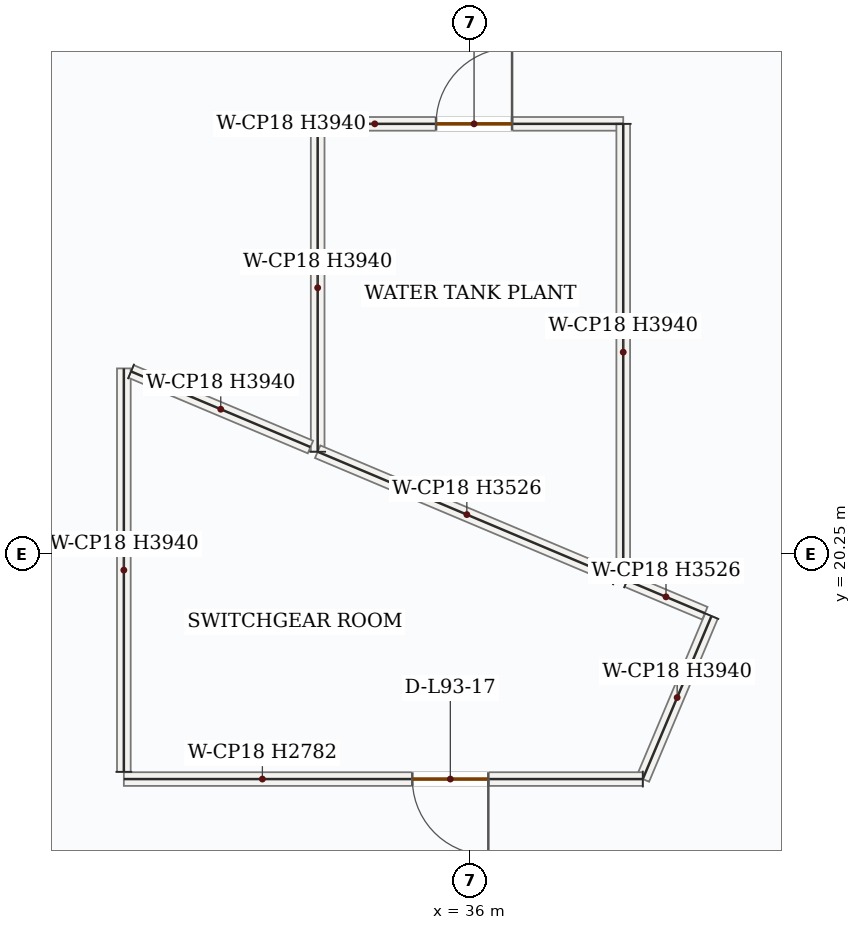
"""IFC4 building model, lengths in metres.
Left out: names, types, materials, properties, quantities, classifications, styles, units other than length and angle.
Written with IfcOpenShell. Run it as: python <this file> out.ifc"""

import sys

from ifc_helpers import new_model, si_unit, direction, frame, frame_2d, origin, place, context, subcontext, project, spatial, rectangle, extrude, source, transform, mapped, element, fill, save


model = new_model("IFC4")
c1 = context("Model", 3, precision=1e-05, world=origin(), true_north=direction((0.0, 1.0)))
c2 = subcontext(c1, "Body", "Model", "MODEL_VIEW")
j1 = project(units=[si_unit("LENGTHUNIT", "METRE"), si_unit("PLANEANGLEUNIT", "RADIAN")], contexts=[c1])
p1 = place(None, origin())
s1 = spatial("IfcSite", under=j1, at=p1, CompositionType="ELEMENT")
p2 = place(p1, origin())
s2 = spatial("IfcBuilding", under=s1, at=p2, CompositionType="ELEMENT")
p3 = place(p2, frame((0.0, 0.0, 383.85)))
s3 = spatial("IfcBuildingStorey", under=s2, at=p3, CompositionType="ELEMENT", Elevation=383.85)
m1 = source(origin(), c2, "Body", "SweptSolid", [
    extrude(rectangle(XDim=4.313, YDim=0.18, at=frame_2d((2.157, 0.0))), origin(), (0.0, 0.0, 1.0), 3.94),
])
p4 = place(p3, frame((33.99, 21.596, 0.0), z_axis=(0.0, 0.0, 1.0), x_axis=(0.0, 1.0, 0.0)))
e1 = element("IfcWall", 1, at=p4, inside=s3, PredefinedType="PARTITIONING", context=c2, shape_type="MappedRepresentation", body=[
    mapped(m1, transform((0.0, 0.0, 0.0), x_axis=(1.0, 0.0, 0.0), y_axis=(0.0, 1.0, 0.0), z_axis=(0.0, 0.0, 1.0), scale=1.0)),
])
p5 = place(p3, frame((34.085, 25.91, 0.0), z_axis=(0.0, 0.0, 1.0), x_axis=(1.0, 0.0, 0.0)))
e2 = element("IfcWall", 2, at=p5, inside=s3, PredefinedType="PARTITIONING", context=c2, shape_type="SweptSolid", body=[
    extrude(rectangle(XDim=3.925, YDim=0.18, at=frame_2d((1.962, 0.0))), origin(), (0.0, 0.0, 1.0), 3.94),
])
p6 = place(p5, frame((1.462, 0.0, 0.0)))
e3 = element("IfcOpeningElement", 3, at=p6, cuts=e2, PredefinedType="OPENING", context=c2, shape_type="SweptSolid", body=[
    extrude(rectangle(XDim=1.0, YDim=2.15, at=frame_2d((0.5, 1.075))), frame((0.0, 0.1, 0.0), z_axis=(0.0, -1.0, 0.0), x_axis=(1.0, 0.0, 0.0)), (0.0, 0.0, 1.0), 0.2),
])
m2 = source(origin(), c2, "Body", "SweptSolid", [
    extrude(rectangle(XDim=6.007, YDim=0.18, at=frame_2d((3.004, 0.0))), origin(), (0.0, 0.0, 1.0), 3.94),
])
p7 = place(p3, frame((38.01, 25.91, 0.0), z_axis=(0.0, 0.0, 1.0), x_axis=(0.0, -1.0, 0.0)))
e4 = element("IfcWall", 4, at=p7, inside=s3, PredefinedType="PARTITIONING", context=c2, shape_type="MappedRepresentation", body=[
    mapped(m2, transform((0.0, 0.0, 0.0), x_axis=(1.0, 0.0, 0.0), y_axis=(0.0, 1.0, 0.0), z_axis=(0.0, 0.0, 1.0), scale=1.0)),
])
m3 = source(origin(), c2, "Body", "SweptSolid", [
    extrude(rectangle(XDim=4.259, YDim=0.18, at=frame_2d((2.13, 0.0))), origin(), (0.0, 0.0, 1.0), 3.526),
])
p8 = place(p3, frame((37.915, 19.942, 0.0), z_axis=(0.0, 0.0, 1.0), x_axis=(-0.921517727691, 0.388336294403, 0.0)))
e5 = element("IfcWall", 5, at=p8, inside=s3, PredefinedType="PARTITIONING", context=c2, shape_type="MappedRepresentation", body=[
    mapped(m3, transform((0.0, 0.0, 0.0), x_axis=(1.0, 0.0, 0.0), y_axis=(0.0, 1.0, 0.0), z_axis=(0.0, 0.0, 1.0), scale=1.0)),
])
m4 = source(origin(), c2, "Body", "SweptSolid", [
    extrude(rectangle(XDim=2.327, YDim=0.18, at=frame_2d((1.164, 0.0))), origin(), (0.0, 0.0, 1.0), 3.94),
])
p9 = place(p3, frame((39.171, 19.435, 0.0), z_axis=(0.0, 0.0, 1.0), x_axis=(-0.388328975107, -0.921520812078, 0.0)))
e6 = element("IfcWall", 6, at=p9, inside=s3, PredefinedType="PARTITIONING", context=c2, shape_type="MappedRepresentation", body=[
    mapped(m4, transform((0.0, 0.0, 0.0), x_axis=(1.0, 0.0, 0.0), y_axis=(0.0, 1.0, 0.0), z_axis=(0.0, 0.0, 1.0), scale=1.0)),
])
p10 = place(p3, frame((38.267, 17.29, 0.0), z_axis=(0.0, 0.0, 1.0), x_axis=(-1.0, 0.0, 0.0)))
e7 = element("IfcWall", 7, at=p10, inside=s3, PredefinedType="PARTITIONING", context=c2, shape_type="SweptSolid", body=[
    extrude(rectangle(XDim=6.827, YDim=0.18, at=frame_2d((3.414, 0.0))), origin(), (0.0, 0.0, 1.0), 2.782),
])
p11 = place(p10, frame((2.032, 0.0, 0.0)))
e8 = element("IfcOpeningElement", 8, at=p11, cuts=e7, PredefinedType="OPENING", context=c2, shape_type="SweptSolid", body=[
    extrude(rectangle(XDim=1.0, YDim=2.15, at=frame_2d((0.5, 1.075))), frame((0.0, 0.1, 0.0), z_axis=(0.0, -1.0, 0.0), x_axis=(1.0, 0.0, 0.0)), (0.0, 0.0, 1.0), 0.2),
])
m5 = source(origin(), c2, "Body", "SweptSolid", [
    extrude(rectangle(XDim=5.308, YDim=0.18, at=frame_2d((2.654, 0.0))), origin(), (0.0, 0.0, 1.0), 3.94),
])
p12 = place(p3, frame((31.44, 17.385, 0.0), z_axis=(0.0, 0.0, 1.0), x_axis=(0.0, 1.0, 0.0)))
e9 = element("IfcWall", 9, at=p12, inside=s3, PredefinedType="PARTITIONING", context=c2, shape_type="MappedRepresentation", body=[
    mapped(m5, transform((0.0, 0.0, 0.0), x_axis=(1.0, 0.0, 0.0), y_axis=(0.0, 1.0, 0.0), z_axis=(0.0, 0.0, 1.0), scale=1.0)),
])
m6 = source(origin(), c2, "Body", "SweptSolid", [
    extrude(rectangle(XDim=2.561, YDim=0.18, at=frame_2d((1.281, 0.0))), origin(), (0.0, 0.0, 1.0), 3.94),
])
p13 = place(p3, frame((31.535, 22.653, 0.0), z_axis=(0.0, 0.0, 1.0), x_axis=(0.921543833829, -0.388274339008, 0.0)))
e10 = element("IfcWall", 10, at=p13, inside=s3, PredefinedType="PARTITIONING", context=c2, shape_type="MappedRepresentation", body=[
    mapped(m6, transform((0.0, 0.0, 0.0), x_axis=(1.0, 0.0, 0.0), y_axis=(0.0, 1.0, 0.0), z_axis=(0.0, 0.0, 1.0), scale=1.0)),
])
m7 = source(origin(), c2, "Body", "SweptSolid", [
    extrude(rectangle(XDim=1.109, YDim=0.18, at=frame_2d((0.555, 0.0))), origin(), (0.0, 0.0, 1.0), 3.526),
])
p14 = place(p3, frame((38.062, 19.903, 0.0), z_axis=(0.0, 0.0, 1.0), x_axis=(0.921473730863, -0.388440681866, 0.0)))
e11 = element("IfcWall", 11, at=p14, inside=s3, PredefinedType="PARTITIONING", context=c2, shape_type="MappedRepresentation", body=[
    mapped(m7, transform((0.0, 0.0, 0.0), x_axis=(1.0, 0.0, 0.0), y_axis=(0.0, 1.0, 0.0), z_axis=(0.0, 0.0, 1.0), scale=1.0)),
])
m8 = source(origin(), c2, "Body", "SweptSolid", [
    extrude(rectangle(XDim=1.0, YDim=2.15, at=frame_2d((0.5, 1.075))), frame((0.0, 0.025, 0.0), z_axis=(0.0, -1.0, 0.0), x_axis=(1.0, 0.0, 0.0)), (0.0, 0.0, 1.0), 0.05),
])
p15 = place(p11, origin())
e12 = element("IfcDoor", 12, at=p15, inside=s3, OperationType="SINGLE_SWING_LEFT", PredefinedType="DOOR", context=c2, shape_type="MappedRepresentation", body=[
    mapped(m8, transform((0.0, 0.0, 0.0), x_axis=(1.0, 0.0, 0.0), y_axis=(0.0, 1.0, 0.0), z_axis=(0.0, 0.0, 1.0), scale=1.0)),
])
fill(e8, e12)
p16 = place(p6, origin())
e13 = element("IfcDoor", 13, at=p16, inside=s3, OperationType="SINGLE_SWING_RIGHT", PredefinedType="DOOR", context=c2, shape_type="MappedRepresentation", body=[
    mapped(m8, transform((0.0, 0.0, 0.0), x_axis=(1.0, 0.0, 0.0), y_axis=(0.0, 1.0, 0.0), z_axis=(0.0, 0.0, 1.0), scale=1.0)),
])
fill(e3, e13)
save(model, sys.argv[1])
